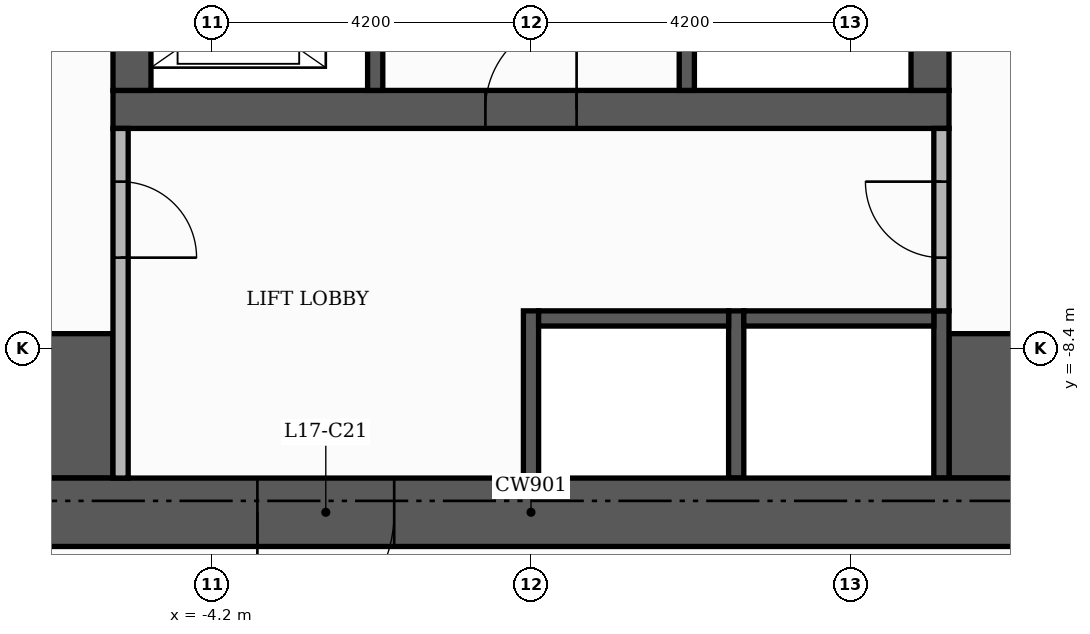
"""IFC4 building model, lengths in metres.
Left out: names, types, materials, properties, quantities, classifications, styles, units other than length and angle.
Written with IfcOpenShell. Run it as: python <this file> out.ifc"""

import sys

from ifc_helpers import new_model, si_unit, direction, frame, frame_2d, origin, place, context, subcontext, project, spatial, rectangle, extrude, element, fill, save


model = new_model("IFC4")
c1 = context("Model", 3, precision=1e-05, world=origin(), true_north=direction((0.0, 1.0)))
c2 = subcontext(c1, "Body", "Model", "MODEL_VIEW")
j1 = project(units=[si_unit("LENGTHUNIT", "METRE"), si_unit("PLANEANGLEUNIT", "RADIAN")], contexts=[c1])
p1 = place(None, origin())
s1 = spatial("IfcSite", under=j1, at=p1, CompositionType="ELEMENT")
p2 = place(p1, origin())
s2 = spatial("IfcBuilding", under=s1, at=p2, CompositionType="ELEMENT")
p3 = place(p2, frame((0.0, 0.0, 73.8)))
s3 = spatial("IfcBuildingStorey", under=s2, at=p3, CompositionType="ELEMENT", Elevation=73.8)
p4 = place(p3, frame((-5.5, -5.25, 0.0), z_axis=(0.0, 0.0, 1.0), x_axis=(1.0, 0.0, 0.0)))
e1 = element("IfcWall", 1, at=p4, inside=s3, PredefinedType="SHEAR", context=c2, shape_type="SweptSolid", body=[
    extrude(rectangle(XDim=11.0, YDim=0.5, at=frame_2d((5.5, 0.0))), origin(), (0.0, 0.0, 1.0), 4.98),
])
p5 = place(p4, frame((4.9, 0.0, 0.0)))
e2 = element("IfcOpeningElement", 2, at=p5, cuts=e1, PredefinedType="OPENING", context=c2, shape_type="SweptSolid", body=[
    extrude(rectangle(XDim=1.2, YDim=2.1, at=frame_2d((0.6, 1.05))), frame((0.0, 0.26, 0.0), z_axis=(0.0, -1.0, 0.0), x_axis=(1.0, 0.0, 0.0)), (0.0, 0.0, 1.0), 0.52),
])
for number, where, z_axis, x_axis in (
    (3, (-5.25, -5.0, 0.0), (0.0, 0.0, 1.0), (0.0, 1.0, 0.0)),
    (4, (5.25, -5.0, 0.0), (0.0, 0.0, 1.0), (0.0, 1.0, 0.0)),
):
    element("IfcWall", number, at=place(p3, frame(where, z_axis=z_axis, x_axis=x_axis)), inside=s3, PredefinedType="SHEAR", context=c2, shape_type="SweptSolid", body=[
        extrude(rectangle(XDim=10.5, YDim=0.5, at=frame_2d((5.25, 0.0))), origin(), (0.0, 0.0, 1.0), 4.98),
    ])
for number, where, z_axis, x_axis in (
    (5, (-10.1, -9.15, 0.0), (0.0, 0.0, 1.0), (1.0, 0.0, 0.0)),
    (6, (5.5, -9.15, 0.0), (0.0, 0.0, 1.0), (1.0, 0.0, 0.0)),
):
    element("IfcWall", number, at=place(p3, frame(where, z_axis=z_axis, x_axis=x_axis)), inside=s3, PredefinedType="SHEAR", context=c2, shape_type="SweptSolid", body=[
        extrude(rectangle(XDim=4.6, YDim=1.9, at=frame_2d((2.3, 0.0))), origin(), (0.0, 0.0, 1.0), 4.98),
    ])
p6 = place(p3, frame((2.05, -5.0, 0.0), z_axis=(0.0, 0.0, 1.0), x_axis=(0.0, 1.0, 0.0)))
e7 = element("IfcWall", 7, at=p6, inside=s3, PredefinedType="SHEAR", context=c2, shape_type="SweptSolid", body=[
    extrude(rectangle(XDim=6.6, YDim=0.2, at=frame_2d((3.3, 0.0))), origin(), (0.0, 0.0, 1.0), 4.98),
])
p7 = place(p6, frame((5.25, 0.0, 0.0)))
e8 = element("IfcOpeningElement", 8, at=p7, cuts=e7, PredefinedType="OPENING", context=c2, shape_type="SweptSolid", body=[
    extrude(rectangle(XDim=1.0, YDim=2.1, at=frame_2d((0.5, 1.05))), frame((0.0, 0.11, 0.0), z_axis=(0.0, -1.0, 0.0), x_axis=(1.0, 0.0, 0.0)), (0.0, 0.0, 1.0), 0.22),
])
for number, where, z_axis, x_axis in (
    (9, (0.0, -10.1, 0.0), (0.0, 0.0, 1.0), (0.0, 1.0, 0.0)),
    (10, (2.7, -10.1, 0.0), (0.0, 0.0, 1.0), (0.0, 1.0, 0.0)),
    (11, (5.4, -10.1, 0.0), (0.0, 0.0, 1.0), (0.0, 1.0, 0.0)),
):
    element("IfcWall", number, at=place(p3, frame(where, z_axis=z_axis, x_axis=x_axis)), inside=s3, PredefinedType="SHEAR", context=c2, shape_type="SweptSolid", body=[
        extrude(rectangle(XDim=2.2, YDim=0.2, at=frame_2d((1.1, 0.0))), origin(), (0.0, 0.0, 1.0), 4.98),
    ])
for number, where, z_axis, x_axis in (
    (12, (0.1, -8.0, 0.0), (0.0, 0.0, 1.0), (1.0, 0.0, 0.0)),
    (13, (2.8, -8.0, 0.0), (0.0, 0.0, 1.0), (1.0, 0.0, 0.0)),
):
    element("IfcWall", number, at=place(p3, frame(where, z_axis=z_axis, x_axis=x_axis)), inside=s3, PredefinedType="SHEAR", context=c2, shape_type="SweptSolid", body=[
        extrude(rectangle(XDim=2.5, YDim=0.2, at=frame_2d((1.25, 0.0))), origin(), (0.0, 0.0, 1.0), 4.98),
    ])
p8 = place(p3, frame((-2.05, -5.0, 0.0), z_axis=(0.0, 0.0, 1.0), x_axis=(0.0, 1.0, 0.0)))
e14 = element("IfcWall", 14, at=p8, inside=s3, PredefinedType="SHEAR", context=c2, shape_type="SweptSolid", body=[
    extrude(rectangle(XDim=3.4, YDim=0.2, at=frame_2d((1.7, 0.0))), origin(), (0.0, 0.0, 1.0), 4.98),
])
p9 = place(p8, frame((0.55, 0.0, 0.0)))
e15 = element("IfcOpeningElement", 15, at=p9, cuts=e14, PredefinedType="OPENING", context=c2, shape_type="SweptSolid", body=[
    extrude(rectangle(XDim=1.1, YDim=2.1, at=frame_2d((0.55, 1.05))), frame((0.0, 0.11, 0.0), z_axis=(0.0, -1.0, 0.0), x_axis=(1.0, 0.0, 0.0)), (0.0, 0.0, 1.0), 0.22),
])
p10 = place(p8, frame((2.45, 0.0, 0.0)))
e16 = element("IfcOpeningElement", 16, at=p10, cuts=e14, PredefinedType="OPENING", context=c2, shape_type="SweptSolid", body=[
    extrude(rectangle(XDim=0.8, YDim=2.1, at=frame_2d((0.4, 1.05))), frame((0.0, 0.11, 0.0), z_axis=(0.0, -1.0, 0.0), x_axis=(1.0, 0.0, 0.0)), (0.0, 0.0, 1.0), 0.22),
])
p11 = place(p3, frame((-11.0, -10.55, 0.0), z_axis=(0.0, 0.0, 1.0), x_axis=(1.0, 0.0, 0.0)))
e17 = element("IfcWall", 17, at=p11, inside=s3, PredefinedType="SHEAR", context=c2, shape_type="SweptSolid", body=[
    extrude(rectangle(XDim=22.0, YDim=0.9, at=frame_2d((11.0, 0.0))), origin(), (0.0, 0.0, 1.0), 4.98),
])
p12 = place(p11, frame((7.4, 0.0, 0.0)))
e18 = element("IfcOpeningElement", 18, at=p12, cuts=e17, PredefinedType="OPENING", context=c2, shape_type="SweptSolid", body=[
    extrude(rectangle(XDim=1.8, YDim=2.2, at=frame_2d((0.9, 1.1))), frame((0.0, 0.46, 0.0), z_axis=(0.0, -1.0, 0.0), x_axis=(1.0, 0.0, 0.0)), (0.0, 0.0, 1.0), 0.92),
])
p13 = place(p3, frame((-5.4, -10.1, 0.0), z_axis=(0.0, 0.0, 1.0), x_axis=(0.0, 1.0, 0.0)))
e19 = element("IfcWall", 19, at=p13, inside=s3, PredefinedType="PARTITIONING", context=c2, shape_type="SweptSolid", body=[
    extrude(rectangle(XDim=4.6, YDim=0.2, at=frame_2d((2.3, 0.0))), origin(), (0.0, 0.0, 1.0), 4.98),
])
p14 = place(p13, frame((2.9, 0.0, 0.0)))
e20 = element("IfcOpeningElement", 20, at=p14, cuts=e19, PredefinedType="OPENING", context=c2, shape_type="SweptSolid", body=[
    extrude(rectangle(XDim=1.0, YDim=2.1, at=frame_2d((0.5, 1.05))), frame((0.0, 0.11, 0.0), z_axis=(0.0, -1.0, 0.0), x_axis=(1.0, 0.0, 0.0)), (0.0, 0.0, 1.0), 0.22),
])
p15 = place(p3, frame((5.4, -7.9, 0.0), z_axis=(0.0, 0.0, 1.0), x_axis=(0.0, 1.0, 0.0)))
e21 = element("IfcWall", 21, at=p15, inside=s3, PredefinedType="PARTITIONING", context=c2, shape_type="SweptSolid", body=[
    extrude(rectangle(XDim=2.4, YDim=0.2, at=frame_2d((1.2, 0.0))), origin(), (0.0, 0.0, 1.0), 4.98),
])
p16 = place(p15, frame((0.7, 0.0, 0.0)))
e22 = element("IfcOpeningElement", 22, at=p16, cuts=e21, PredefinedType="OPENING", context=c2, shape_type="SweptSolid", body=[
    extrude(rectangle(XDim=1.0, YDim=2.1, at=frame_2d((0.5, 1.05))), frame((0.0, 0.11, 0.0), z_axis=(0.0, -1.0, 0.0), x_axis=(1.0, 0.0, 0.0)), (0.0, 0.0, 1.0), 0.22),
])
p17 = place(p5, origin())
e23 = element("IfcDoor", 23, at=p17, inside=s3, OperationType="SINGLE_SWING_RIGHT", PredefinedType="DOOR", context=c2, shape_type="SweptSolid", body=[
    extrude(rectangle(XDim=1.2, YDim=2.1, at=frame_2d((0.6, 1.05))), frame((0.0, 0.025, 0.0), z_axis=(0.0, -1.0, 0.0), x_axis=(1.0, 0.0, 0.0)), (0.0, 0.0, 1.0), 0.05),
])
fill(e2, e23)
p18 = place(p14, frame((1.0, 0.0, 0.0), z_axis=(0.0, 0.0, 1.0), x_axis=(-1.0, 0.0, 0.0)))
e24 = element("IfcDoor", 24, at=p18, inside=s3, OperationType="SINGLE_SWING_LEFT", PredefinedType="DOOR", context=c2, shape_type="SweptSolid", body=[
    extrude(rectangle(XDim=1.0, YDim=2.1, at=frame_2d((0.5, 1.05))), frame((0.0, 0.025, 0.0), z_axis=(0.0, -1.0, 0.0), x_axis=(1.0, 0.0, 0.0)), (0.0, 0.0, 1.0), 0.05),
])
fill(e20, e24)
p19 = place(p16, origin())
e25 = element("IfcDoor", 25, at=p19, inside=s3, OperationType="SINGLE_SWING_RIGHT", PredefinedType="DOOR", context=c2, shape_type="SweptSolid", body=[
    extrude(rectangle(XDim=1.0, YDim=2.1, at=frame_2d((0.5, 1.05))), frame((0.0, 0.025, 0.0), z_axis=(0.0, -1.0, 0.0), x_axis=(1.0, 0.0, 0.0)), (0.0, 0.0, 1.0), 0.05),
])
fill(e22, e25)
p20 = place(p12, frame((1.8, 0.0, 0.0), z_axis=(0.0, 0.0, 1.0), x_axis=(-1.0, 0.0, 0.0)))
e26 = element("IfcDoor", 26, at=p20, inside=s3, OperationType="DOUBLE_DOOR_SINGLE_SWING", PredefinedType="DOOR", context=c2, shape_type="SweptSolid", body=[
    extrude(rectangle(XDim=1.8, YDim=2.2, at=frame_2d((0.9, 1.1))), frame((0.0, 0.025, 0.0), z_axis=(0.0, -1.0, 0.0), x_axis=(1.0, 0.0, 0.0)), (0.0, 0.0, 1.0), 0.05),
])
fill(e18, e26)
save(model, sys.argv[1])
